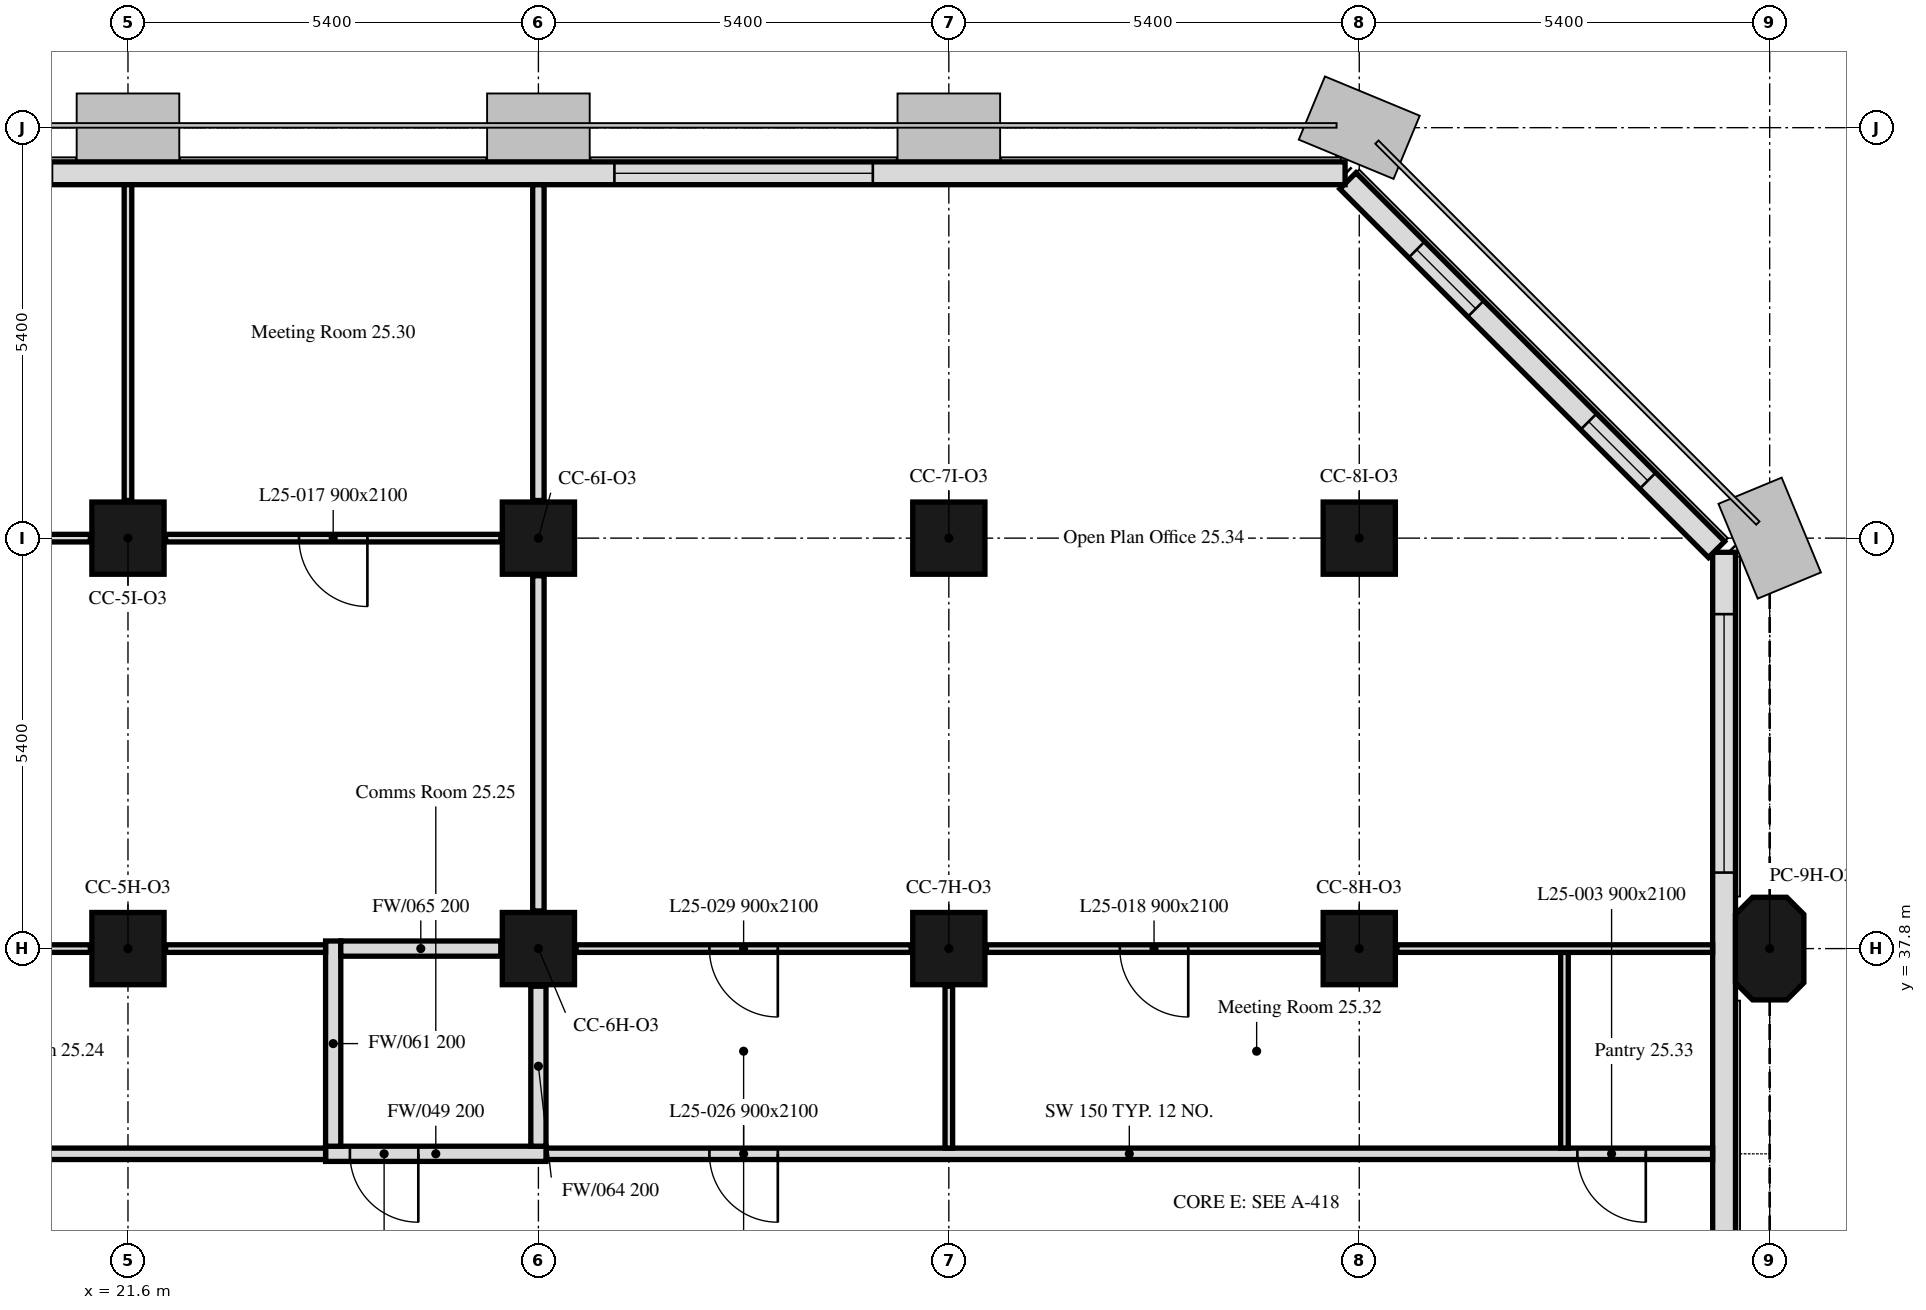
"""IFC4 building model, lengths in metres.
Left out: names, types, materials, properties, quantities, classifications, styles, units other than length and angle.
Written with IfcOpenShell. Run it as: python <this file> out.ifc"""

import sys

from ifc_helpers import new_model, si_unit, direction, frame, frame_2d, origin, origin_2d, place, context, subcontext, project, spatial, polyline, rectangle, outline, extrude, element, fill, save


model = new_model("IFC4")
c1 = context("Model", 3, precision=1e-05, world=origin(), true_north=direction((0.0, 1.0)))
c2 = subcontext(c1, "Body", "Model", "MODEL_VIEW")
j1 = project(units=[si_unit("LENGTHUNIT", "METRE"), si_unit("PLANEANGLEUNIT", "RADIAN")], contexts=[c1])
p1 = place(None, origin())
s1 = spatial("IfcSite", under=j1, at=p1, CompositionType="ELEMENT")
p2 = place(p1, origin())
s2 = spatial("IfcBuilding", under=s1, at=p2, CompositionType="ELEMENT")
p3 = place(p2, frame((0.0, 0.0, 106.8)))
s3 = spatial("IfcBuildingStorey", under=s2, at=p3, CompositionType="ELEMENT", Elevation=106.8)
for number, where, z_axis, x_axis in (
    (1, (21.6, 37.8, 0.0), (0.0, 0.0, 1.0), (1.0, 0.0, 0.0)),
    (2, (27.0, 37.8, 0.0), (0.0, 0.0, 1.0), (1.0, 0.0, 0.0)),
    (3, (32.4, 37.8, 0.0), (0.0, 0.0, 1.0), (1.0, 0.0, 0.0)),
    (4, (37.8, 37.8, 0.0), (0.0, 0.0, 1.0), (1.0, 0.0, 0.0)),
):
    element("IfcColumn", number, at=place(p3, frame(where, z_axis=z_axis, x_axis=x_axis)), inside=s3, PredefinedType="COLUMN", context=c2, shape_type="SweptSolid", body=[
        extrude(rectangle(XDim=0.95, YDim=0.95, at=origin_2d()), origin(), (0.0, 0.0, 1.0), 3.5),
    ])
p4 = place(p3, frame((43.2, 37.8, 0.0), z_axis=(0.0, 0.0, 1.0), x_axis=(0.0, 1.0, 0.0)))
e5 = element("IfcColumn", 5, at=p4, inside=s3, PredefinedType="COLUMN", context=c2, shape_type="SweptSolid", body=[
    extrude(outline(polyline([(-0.45, -0.45), (0.45, -0.45), (0.675, -0.225), (0.675, 0.225), (0.45, 0.45), (-0.45, 0.45), (-0.675, 0.225), (-0.675, -0.225), (-0.45, -0.45)])), origin(), (0.0, 0.0, 1.0), 3.5),
])
for number, where, z_axis, x_axis in (
    (6, (21.6, 43.2, 0.0), (0.0, 0.0, 1.0), (1.0, 0.0, 0.0)),
    (7, (27.0, 43.2, 0.0), (0.0, 0.0, 1.0), (1.0, 0.0, 0.0)),
    (8, (32.4, 43.2, 0.0), (0.0, 0.0, 1.0), (1.0, 0.0, 0.0)),
    (9, (37.8, 43.2, 0.0), (0.0, 0.0, 1.0), (1.0, 0.0, 0.0)),
):
    element("IfcColumn", number, at=place(p3, frame(where, z_axis=z_axis, x_axis=x_axis)), inside=s3, PredefinedType="COLUMN", context=c2, shape_type="SweptSolid", body=[
        extrude(rectangle(XDim=0.95, YDim=0.95, at=origin_2d()), origin(), (0.0, 0.0, 1.0), 3.5),
    ])
p5 = place(p3, frame((42.6, 32.4, 0.0), z_axis=(0.0, 0.0, 1.0), x_axis=(0.0, 1.0, 0.0)))
e10 = element("IfcWall", 10, at=p5, inside=s3, PredefinedType="SOLIDWALL", context=c2, shape_type="SweptSolid", body=[
    extrude(rectangle(XDim=10.614, YDim=0.3, at=frame_2d((5.307, 0.0))), origin(), (0.0, 0.0, 1.0), 3.5),
])
p6 = place(p5, frame((6.4, 0.0, 0.9)))
e11 = element("IfcOpeningElement", 11, at=p6, cuts=e10, PredefinedType="OPENING", context=c2, shape_type="SweptSolid", body=[
    extrude(rectangle(XDim=3.4, YDim=1.7, at=frame_2d((1.7, 0.85))), frame((0.0, 0.16, 0.0), z_axis=(0.0, -1.0, 0.0), x_axis=(1.0, 0.0, 0.0)), (0.0, 0.0, 1.0), 0.32),
])
p7 = place(p3, frame((42.501, 43.051, 0.0), z_axis=(0.0, 0.0, 1.0), x_axis=(-0.707106781187, 0.707106781187, 0.0)))
e12 = element("IfcWall", 12, at=p7, inside=s3, PredefinedType="SOLIDWALL", context=c2, shape_type="SweptSolid", body=[
    extrude(rectangle(XDim=6.86, YDim=0.3, at=frame_2d((3.43, 0.0))), origin(), (0.0, 0.0, 1.0), 3.5),
])
p8 = place(p7, frame((1.28, 0.0, 0.9)))
e13 = element("IfcOpeningElement", 13, at=p8, cuts=e12, PredefinedType="OPENING", context=c2, shape_type="SweptSolid", body=[
    extrude(rectangle(XDim=1.1, YDim=1.7, at=frame_2d((0.55, 0.85))), frame((0.0, 0.16, 0.0), z_axis=(0.0, -1.0, 0.0), x_axis=(1.0, 0.0, 0.0)), (0.0, 0.0, 1.0), 0.32),
])
p9 = place(p7, frame((4.48, 0.0, 0.9)))
e14 = element("IfcOpeningElement", 14, at=p9, cuts=e12, PredefinedType="OPENING", context=c2, shape_type="SweptSolid", body=[
    extrude(rectangle(XDim=1.1, YDim=1.7, at=frame_2d((0.55, 0.85))), frame((0.0, 0.16, 0.0), z_axis=(0.0, -1.0, 0.0), x_axis=(1.0, 0.0, 0.0)), (0.0, 0.0, 1.0), 0.32),
])
p10 = place(p3, frame((37.614, 48.0, 0.0), z_axis=(0.0, 0.0, 1.0), x_axis=(-1.0, 0.0, 0.0)))
e15 = element("IfcWall", 15, at=p10, inside=s3, PredefinedType="SOLIDWALL", context=c2, shape_type="SweptSolid", body=[
    extrude(rectangle(XDim=32.027, YDim=0.3, at=frame_2d((16.014, 0.0))), origin(), (0.0, 0.0, 1.0), 3.5),
])
p11 = place(p10, frame((6.214, 0.0, 0.9)))
e16 = element("IfcOpeningElement", 16, at=p11, cuts=e15, PredefinedType="OPENING", context=c2, shape_type="SweptSolid", body=[
    extrude(rectangle(XDim=3.4, YDim=1.7, at=frame_2d((1.7, 0.85))), frame((0.0, 0.16, 0.0), z_axis=(0.0, -1.0, 0.0), x_axis=(1.0, 0.0, 0.0)), (0.0, 0.0, 1.0), 0.32),
])
p12 = place(p10, frame((17.014, 0.0, 0.9)))
e17 = element("IfcOpeningElement", 17, at=p12, cuts=e15, PredefinedType="OPENING", context=c2, shape_type="SweptSolid", body=[
    extrude(rectangle(XDim=3.4, YDim=1.7, at=frame_2d((1.7, 0.85))), frame((0.0, 0.16, 0.0), z_axis=(0.0, -1.0, 0.0), x_axis=(1.0, 0.0, 0.0)), (0.0, 0.0, 1.0), 0.32),
])
p13 = place(p10, frame((27.814, 0.0, 0.9)))
e18 = element("IfcOpeningElement", 18, at=p13, cuts=e15, PredefinedType="OPENING", context=c2, shape_type="SweptSolid", body=[
    extrude(rectangle(XDim=3.4, YDim=1.7, at=frame_2d((1.7, 0.85))), frame((0.0, 0.16, 0.0), z_axis=(0.0, -1.0, 0.0), x_axis=(1.0, 0.0, 0.0)), (0.0, 0.0, 1.0), 0.32),
])
p14 = place(p3, frame((42.449, 35.1, 0.0), z_axis=(0.0, 0.0, 1.0), x_axis=(-1.0, 0.0, 0.0)))
e19 = element("IfcWall", 19, at=p14, inside=s3, PredefinedType="PARTITIONING", context=c2, shape_type="SweptSolid", body=[
    extrude(rectangle(XDim=15.349, YDim=0.15, at=frame_2d((7.674, 0.0))), origin(), (0.0, 0.0, 1.0), 2.75),
])
p15 = place(p14, frame((0.879, 0.0, 0.0)))
e20 = element("IfcOpeningElement", 20, at=p15, cuts=e19, PredefinedType="OPENING", context=c2, shape_type="SweptSolid", body=[
    extrude(rectangle(XDim=0.9, YDim=2.1, at=frame_2d((0.45, 1.05))), frame((0.0, 0.075, 0.0), z_axis=(0.0, -1.0, 0.0), x_axis=(1.0, 0.0, 0.0)), (0.0, 0.0, 1.0), 0.15),
])
p16 = place(p14, frame((12.299, 0.0, 0.0)))
e21 = element("IfcOpeningElement", 21, at=p16, cuts=e19, PredefinedType="OPENING", context=c2, shape_type="SweptSolid", body=[
    extrude(rectangle(XDim=0.9, YDim=2.1, at=frame_2d((0.45, 1.05))), frame((0.0, 0.075, 0.0), z_axis=(0.0, -1.0, 0.0), x_axis=(1.0, 0.0, 0.0)), (0.0, 0.0, 1.0), 0.15),
])
p17 = place(p3, frame((27.1, 35.1, 0.0), z_axis=(0.0, 0.0, 1.0), x_axis=(-1.0, 0.0, 0.0)))
e22 = element("IfcWall", 22, at=p17, inside=s3, PredefinedType="PARTITIONING", context=c2, shape_type="SweptSolid", body=[
    extrude(rectangle(XDim=2.9, YDim=0.2, at=frame_2d((1.45, 0.0))), origin(), (0.0, 0.0, 1.0), 2.75),
])
p18 = place(p17, frame((1.68, 0.0, 0.0)))
e23 = element("IfcOpeningElement", 23, at=p18, cuts=e22, PredefinedType="OPENING", context=c2, shape_type="SweptSolid", body=[
    extrude(rectangle(XDim=0.9, YDim=2.1, at=frame_2d((0.45, 1.05))), frame((0.0, 0.1, 0.0), z_axis=(0.0, -1.0, 0.0), x_axis=(1.0, 0.0, 0.0)), (0.0, 0.0, 1.0), 0.2),
])
p19 = place(p3, frame((24.2, 35.1, 0.0), z_axis=(0.0, 0.0, 1.0), x_axis=(-1.0, 0.0, 0.0)))
e24 = element("IfcWall", 24, at=p19, inside=s3, PredefinedType="PARTITIONING", context=c2, shape_type="SweptSolid", body=[
    extrude(rectangle(XDim=23.449, YDim=0.15, at=frame_2d((11.725, 0.0))), origin(), (0.0, 0.0, 1.0), 2.75),
])
p20 = place(p19, frame((16.27, 0.0, 0.0)))
e25 = element("IfcOpeningElement", 25, at=p20, cuts=e24, PredefinedType="OPENING", context=c2, shape_type="SweptSolid", body=[
    extrude(rectangle(XDim=0.9, YDim=2.1, at=frame_2d((0.45, 1.05))), frame((0.0, 0.075, 0.0), z_axis=(0.0, -1.0, 0.0), x_axis=(1.0, 0.0, 0.0)), (0.0, 0.0, 1.0), 0.15),
])
p21 = place(p19, frame((20.375, 0.0, 0.0)))
e26 = element("IfcOpeningElement", 26, at=p21, cuts=e24, PredefinedType="OPENING", context=c2, shape_type="SweptSolid", body=[
    extrude(rectangle(XDim=0.9, YDim=2.1, at=frame_2d((0.45, 1.05))), frame((0.0, 0.075, 0.0), z_axis=(0.0, -1.0, 0.0), x_axis=(1.0, 0.0, 0.0)), (0.0, 0.0, 1.0), 0.15),
])
p22 = place(p3, frame((24.3, 35.2, 0.0), z_axis=(0.0, 0.0, 1.0), x_axis=(0.0, 1.0, 0.0)))
e27 = element("IfcWall", 27, at=p22, inside=s3, PredefinedType="PARTITIONING", context=c2, shape_type="SweptSolid", body=[
    extrude(rectangle(XDim=2.7, YDim=0.2, at=frame_2d((1.35, 0.0))), origin(), (0.0, 0.0, 1.0), 3.5),
])
p23 = place(p3, frame((24.2, 37.8, 0.0), z_axis=(0.0, 0.0, 1.0), x_axis=(-1.0, 0.0, 0.0)))
e28 = element("IfcWall", 28, at=p23, inside=s3, PredefinedType="PARTITIONING", context=c2, shape_type="SweptSolid", body=[
    extrude(rectangle(XDim=2.105, YDim=0.1, at=frame_2d((1.052, 0.0))), origin(), (0.0, 0.0, 1.0), 3.5),
])
p24 = place(p3, frame((21.105, 37.8, 0.0), z_axis=(0.0, 0.0, 1.0), x_axis=(-1.0, 0.0, 0.0)))
e29 = element("IfcWall", 29, at=p24, inside=s3, PredefinedType="PARTITIONING", context=c2, shape_type="SweptSolid", body=[
    extrude(rectangle(XDim=4.41, YDim=0.1, at=frame_2d((2.205, 0.0))), origin(), (0.0, 0.0, 1.0), 3.5),
])
p25 = place(p24, frame((1.755, 0.0, 0.0)))
e30 = element("IfcOpeningElement", 30, at=p25, cuts=e29, PredefinedType="OPENING", context=c2, shape_type="SweptSolid", body=[
    extrude(rectangle(XDim=0.9, YDim=2.1, at=frame_2d((0.45, 1.05))), frame((0.0, 0.05, 0.0), z_axis=(0.0, -1.0, 0.0), x_axis=(1.0, 0.0, 0.0)), (0.0, 0.0, 1.0), 0.1),
])
p26 = place(p3, frame((27.0, 35.2, 0.0), z_axis=(0.0, 0.0, 1.0), x_axis=(0.0, 1.0, 0.0)))
e31 = element("IfcWall", 31, at=p26, inside=s3, PredefinedType="PARTITIONING", context=c2, shape_type="SweptSolid", body=[
    extrude(rectangle(XDim=2.105, YDim=0.2, at=frame_2d((1.052, 0.0))), origin(), (0.0, 0.0, 1.0), 2.75),
])
p27 = place(p3, frame((26.505, 37.8, 0.0), z_axis=(0.0, 0.0, 1.0), x_axis=(-1.0, 0.0, 0.0)))
e32 = element("IfcWall", 32, at=p27, inside=s3, PredefinedType="PARTITIONING", context=c2, shape_type="SweptSolid", body=[
    extrude(rectangle(XDim=2.105, YDim=0.2, at=frame_2d((1.052, 0.0))), origin(), (0.0, 0.0, 1.0), 3.5),
])
p28 = place(p3, frame((26.505, 43.2, 0.0), z_axis=(0.0, 0.0, 1.0), x_axis=(-1.0, 0.0, 0.0)))
e33 = element("IfcWall", 33, at=p28, inside=s3, PredefinedType="PARTITIONING", context=c2, shape_type="SweptSolid", body=[
    extrude(rectangle(XDim=4.41, YDim=0.1, at=frame_2d((2.205, 0.0))), origin(), (0.0, 0.0, 1.0), 3.5),
])
p29 = place(p28, frame((1.755, 0.0, 0.0)))
e34 = element("IfcOpeningElement", 34, at=p29, cuts=e33, PredefinedType="OPENING", context=c2, shape_type="SweptSolid", body=[
    extrude(rectangle(XDim=0.9, YDim=2.1, at=frame_2d((0.45, 1.05))), frame((0.0, 0.05, 0.0), z_axis=(0.0, -1.0, 0.0), x_axis=(1.0, 0.0, 0.0)), (0.0, 0.0, 1.0), 0.1),
])
p30 = place(p3, frame((21.105, 43.2, 0.0), z_axis=(0.0, 0.0, 1.0), x_axis=(-1.0, 0.0, 0.0)))
e35 = element("IfcWall", 35, at=p30, inside=s3, PredefinedType="PARTITIONING", context=c2, shape_type="SweptSolid", body=[
    extrude(rectangle(XDim=4.41, YDim=0.1, at=frame_2d((2.205, 0.0))), origin(), (0.0, 0.0, 1.0), 3.5),
])
p31 = place(p30, frame((1.755, 0.0, 0.0)))
e36 = element("IfcOpeningElement", 36, at=p31, cuts=e35, PredefinedType="OPENING", context=c2, shape_type="SweptSolid", body=[
    extrude(rectangle(XDim=0.9, YDim=2.1, at=frame_2d((0.45, 1.05))), frame((0.0, 0.05, 0.0), z_axis=(0.0, -1.0, 0.0), x_axis=(1.0, 0.0, 0.0)), (0.0, 0.0, 1.0), 0.1),
])
p32 = place(p3, frame((27.0, 38.295, 0.0), z_axis=(0.0, 0.0, 1.0), x_axis=(0.0, 1.0, 0.0)))
e37 = element("IfcWall", 37, at=p32, inside=s3, PredefinedType="PARTITIONING", context=c2, shape_type="SweptSolid", body=[
    extrude(rectangle(XDim=4.41, YDim=0.15, at=frame_2d((2.205, 0.0))), origin(), (0.0, 0.0, 1.0), 2.75),
])
p33 = place(p3, frame((21.6, 43.695, 0.0), z_axis=(0.0, 0.0, 1.0), x_axis=(0.0, 1.0, 0.0)))
e38 = element("IfcWall", 38, at=p33, inside=s3, PredefinedType="PARTITIONING", context=c2, shape_type="SweptSolid", body=[
    extrude(rectangle(XDim=4.154, YDim=0.1, at=frame_2d((2.077, 0.0))), origin(), (0.0, 0.0, 1.0), 2.75),
])
p34 = place(p3, frame((27.0, 43.695, 0.0), z_axis=(0.0, 0.0, 1.0), x_axis=(0.0, 1.0, 0.0)))
e39 = element("IfcWall", 39, at=p34, inside=s3, PredefinedType="PARTITIONING", context=c2, shape_type="SweptSolid", body=[
    extrude(rectangle(XDim=4.154, YDim=0.15, at=frame_2d((2.077, 0.0))), origin(), (0.0, 0.0, 1.0), 2.75),
])
p35 = place(p3, frame((32.4, 35.175, 0.0), z_axis=(0.0, 0.0, 1.0), x_axis=(0.0, 1.0, 0.0)))
e40 = element("IfcWall", 40, at=p35, inside=s3, PredefinedType="PARTITIONING", context=c2, shape_type="SweptSolid", body=[
    extrude(rectangle(XDim=2.13, YDim=0.1, at=frame_2d((1.065, 0.0))), origin(), (0.0, 0.0, 1.0), 2.75),
])
p36 = place(p3, frame((31.905, 37.8, 0.0), z_axis=(0.0, 0.0, 1.0), x_axis=(-1.0, 0.0, 0.0)))
e41 = element("IfcWall", 41, at=p36, inside=s3, PredefinedType="PARTITIONING", context=c2, shape_type="SweptSolid", body=[
    extrude(rectangle(XDim=4.41, YDim=0.1, at=frame_2d((2.205, 0.0))), origin(), (0.0, 0.0, 1.0), 3.5),
])
p37 = place(p36, frame((1.755, 0.0, 0.0)))
e42 = element("IfcOpeningElement", 42, at=p37, cuts=e41, PredefinedType="OPENING", context=c2, shape_type="SweptSolid", body=[
    extrude(rectangle(XDim=0.9, YDim=2.1, at=frame_2d((0.45, 1.05))), frame((0.0, 0.05, 0.0), z_axis=(0.0, -1.0, 0.0), x_axis=(1.0, 0.0, 0.0)), (0.0, 0.0, 1.0), 0.1),
])
p38 = place(p3, frame((40.5, 35.175, 0.0), z_axis=(0.0, 0.0, 1.0), x_axis=(0.0, 1.0, 0.0)))
e43 = element("IfcWall", 43, at=p38, inside=s3, PredefinedType="PARTITIONING", context=c2, shape_type="SweptSolid", body=[
    extrude(rectangle(XDim=2.575, YDim=0.1, at=frame_2d((1.288, 0.0))), origin(), (0.0, 0.0, 1.0), 3.5),
])
p39 = place(p3, frame((37.305, 37.8, 0.0), z_axis=(0.0, 0.0, 1.0), x_axis=(-1.0, 0.0, 0.0)))
e44 = element("IfcWall", 44, at=p39, inside=s3, PredefinedType="PARTITIONING", context=c2, shape_type="SweptSolid", body=[
    extrude(rectangle(XDim=4.41, YDim=0.1, at=frame_2d((2.205, 0.0))), origin(), (0.0, 0.0, 1.0), 3.5),
])
p40 = place(p39, frame((1.755, 0.0, 0.0)))
e45 = element("IfcOpeningElement", 45, at=p40, cuts=e44, PredefinedType="OPENING", context=c2, shape_type="SweptSolid", body=[
    extrude(rectangle(XDim=0.9, YDim=2.1, at=frame_2d((0.45, 1.05))), frame((0.0, 0.05, 0.0), z_axis=(0.0, -1.0, 0.0), x_axis=(1.0, 0.0, 0.0)), (0.0, 0.0, 1.0), 0.1),
])
p41 = place(p3, frame((42.449, 37.8, 0.0), z_axis=(0.0, 0.0, 1.0), x_axis=(-1.0, 0.0, 0.0)))
e46 = element("IfcWall", 46, at=p41, inside=s3, PredefinedType="PARTITIONING", context=c2, shape_type="SweptSolid", body=[
    extrude(rectangle(XDim=4.154, YDim=0.1, at=frame_2d((2.077, 0.0))), origin(), (0.0, 0.0, 1.0), 3.5),
])
p42 = place(p6, origin())
e47 = element("IfcWindow", 47, at=p42, inside=s3, PartitioningType="SINGLE_PANEL", PredefinedType="WINDOW", context=c2, shape_type="SweptSolid", body=[
    extrude(rectangle(XDim=3.4, YDim=1.7, at=frame_2d((1.7, 0.85))), frame((0.0, 0.03, 0.0), z_axis=(0.0, -1.0, 0.0), x_axis=(1.0, 0.0, 0.0)), (0.0, 0.0, 1.0), 0.06),
])
fill(e11, e47)
p43 = place(p8, origin())
e48 = element("IfcWindow", 48, at=p43, inside=s3, PartitioningType="SINGLE_PANEL", PredefinedType="WINDOW", context=c2, shape_type="SweptSolid", body=[
    extrude(rectangle(XDim=1.1, YDim=1.7, at=frame_2d((0.55, 0.85))), frame((0.0, 0.03, 0.0), z_axis=(0.0, -1.0, 0.0), x_axis=(1.0, 0.0, 0.0)), (0.0, 0.0, 1.0), 0.06),
])
fill(e13, e48)
p44 = place(p9, origin())
e49 = element("IfcWindow", 49, at=p44, inside=s3, PartitioningType="SINGLE_PANEL", PredefinedType="WINDOW", context=c2, shape_type="SweptSolid", body=[
    extrude(rectangle(XDim=1.1, YDim=1.7, at=frame_2d((0.55, 0.85))), frame((0.0, 0.03, 0.0), z_axis=(0.0, -1.0, 0.0), x_axis=(1.0, 0.0, 0.0)), (0.0, 0.0, 1.0), 0.06),
])
fill(e14, e49)
p45 = place(p11, origin())
e50 = element("IfcWindow", 50, at=p45, inside=s3, PartitioningType="SINGLE_PANEL", PredefinedType="WINDOW", context=c2, shape_type="SweptSolid", body=[
    extrude(rectangle(XDim=3.4, YDim=1.7, at=frame_2d((1.7, 0.85))), frame((0.0, 0.03, 0.0), z_axis=(0.0, -1.0, 0.0), x_axis=(1.0, 0.0, 0.0)), (0.0, 0.0, 1.0), 0.06),
])
fill(e16, e50)
p46 = place(p18, origin())
e51 = element("IfcDoor", 51, at=p46, inside=s3, OperationType="SINGLE_SWING_LEFT", PredefinedType="DOOR", context=c2, shape_type="SweptSolid", body=[
    extrude(rectangle(XDim=0.9, YDim=2.1, at=frame_2d((0.45, 1.05))), frame((0.0, 0.025, 0.0), z_axis=(0.0, -1.0, 0.0), x_axis=(1.0, 0.0, 0.0)), (0.0, 0.0, 1.0), 0.05),
])
fill(e23, e51)
p47 = place(p15, origin())
e52 = element("IfcDoor", 52, at=p47, inside=s3, OperationType="SINGLE_SWING_RIGHT", PredefinedType="DOOR", context=c2, shape_type="SweptSolid", body=[
    extrude(rectangle(XDim=0.9, YDim=2.1, at=frame_2d((0.45, 1.05))), frame((0.0, 0.025, 0.0), z_axis=(0.0, -1.0, 0.0), x_axis=(1.0, 0.0, 0.0)), (0.0, 0.0, 1.0), 0.05),
])
fill(e20, e52)
p48 = place(p29, origin())
e53 = element("IfcDoor", 53, at=p48, inside=s3, OperationType="SINGLE_SWING_LEFT", PredefinedType="DOOR", context=c2, shape_type="SweptSolid", body=[
    extrude(rectangle(XDim=0.9, YDim=2.1, at=frame_2d((0.45, 1.05))), frame((0.0, 0.025, 0.0), z_axis=(0.0, -1.0, 0.0), x_axis=(1.0, 0.0, 0.0)), (0.0, 0.0, 1.0), 0.05),
])
fill(e34, e53)
p49 = place(p40, origin())
e54 = element("IfcDoor", 54, at=p49, inside=s3, OperationType="SINGLE_SWING_RIGHT", PredefinedType="DOOR", context=c2, shape_type="SweptSolid", body=[
    extrude(rectangle(XDim=0.9, YDim=2.1, at=frame_2d((0.45, 1.05))), frame((0.0, 0.025, 0.0), z_axis=(0.0, -1.0, 0.0), x_axis=(1.0, 0.0, 0.0)), (0.0, 0.0, 1.0), 0.05),
])
fill(e45, e54)
p50 = place(p16, origin())
e55 = element("IfcDoor", 55, at=p50, inside=s3, OperationType="SINGLE_SWING_RIGHT", PredefinedType="DOOR", context=c2, shape_type="SweptSolid", body=[
    extrude(rectangle(XDim=0.9, YDim=2.1, at=frame_2d((0.45, 1.05))), frame((0.0, 0.025, 0.0), z_axis=(0.0, -1.0, 0.0), x_axis=(1.0, 0.0, 0.0)), (0.0, 0.0, 1.0), 0.05),
])
fill(e21, e55)
p51 = place(p37, origin())
e56 = element("IfcDoor", 56, at=p51, inside=s3, OperationType="SINGLE_SWING_LEFT", PredefinedType="DOOR", context=c2, shape_type="SweptSolid", body=[
    extrude(rectangle(XDim=0.9, YDim=2.1, at=frame_2d((0.45, 1.05))), frame((0.0, 0.025, 0.0), z_axis=(0.0, -1.0, 0.0), x_axis=(1.0, 0.0, 0.0)), (0.0, 0.0, 1.0), 0.05),
])
fill(e42, e56)
save(model, sys.argv[1])
